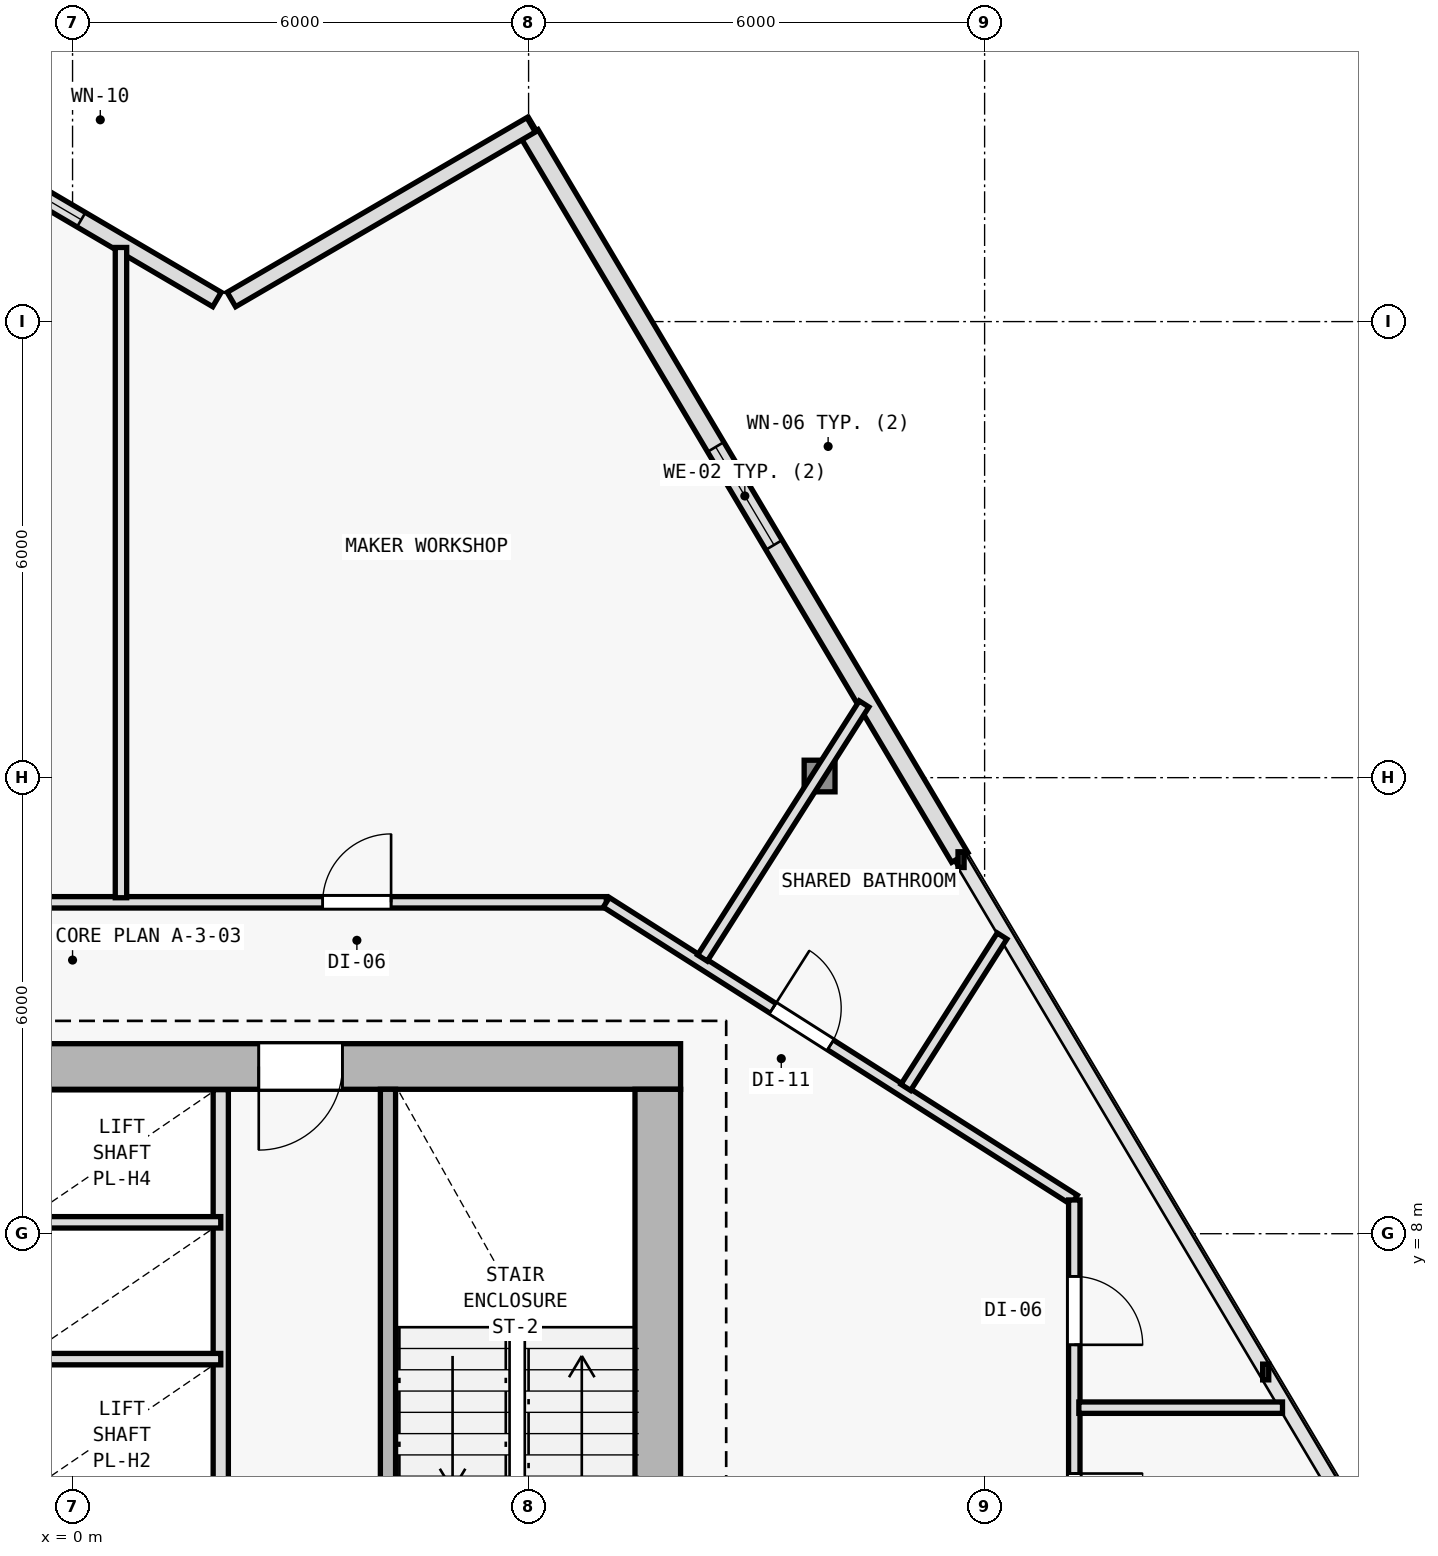
"""IFC4 building model, lengths in metres.
Left out: names, types, materials, properties, quantities, classifications, styles, units other than length and angle.
Written with IfcOpenShell. Run it as: python <this file> out.ifc"""

import sys

from ifc_helpers import new_model, si_unit, direction, frame, frame_2d, origin, origin_2d, place, context, subcontext, project, spatial, rectangle, i_section, extrude, element, fill, save


model = new_model("IFC4")
c1 = context("Model", 3, precision=1e-05, world=origin(), true_north=direction((0.0, 1.0)))
c2 = subcontext(c1, "Body", "Model", "MODEL_VIEW")
j1 = project(units=[si_unit("LENGTHUNIT", "METRE"), si_unit("PLANEANGLEUNIT", "RADIAN")], contexts=[c1])
p1 = place(None, origin())
s1 = spatial("IfcSite", under=j1, at=p1, CompositionType="ELEMENT")
p2 = place(p1, origin())
s2 = spatial("IfcBuilding", under=s1, at=p2, CompositionType="ELEMENT")
p3 = place(p2, frame((0.0, 0.0, 118.5)))
s3 = spatial("IfcBuildingStorey", under=s2, at=p3, CompositionType="ELEMENT", Elevation=118.5)
p4 = place(p3, frame((7.7, 10.2, 0.0), z_axis=(0.0, 0.0, 1.0), x_axis=(1.0, 0.0, 0.0)))
e1 = element("IfcColumn", 1, at=p4, inside=s3, PredefinedType="COLUMN", context=c2, shape_type="SweptSolid", body=[
    extrude(i_section(OverallWidth=0.409, OverallDepth=0.425, WebThickness=0.021, FlangeThickness=0.034, FilletRadius=0.015, at=origin_2d()), origin(), (0.0, 0.0, 1.0), 3.6),
])
p5 = place(p3, frame((9.829, 14.021, 0.006), z_axis=(-0.011767853257, -0.00258484638, 0.999927415465), x_axis=(0.214538664031, -0.976715496773, 0.0)))
e2 = element("IfcColumn", 2, at=p5, inside=s3, PredefinedType="COLUMN", context=c2, shape_type="SweptSolid", body=[
    extrude(i_section(OverallWidth=0.406, OverallDepth=0.416, WebThickness=0.019, FlangeThickness=0.031, FilletRadius=0.015, at=origin_2d()), origin(), (0.0, 0.0, 1.0), 3.589),
])
p6 = place(p3, frame((6.017, 22.462, 0.0), z_axis=(0.0, 0.0, 1.0), x_axis=(0.511085523564, -0.859529864288, 0.0)))
e3 = element("IfcWall", 3, at=p6, inside=s3, PredefinedType="SOLIDWALL", context=c2, shape_type="SweptSolid", body=[
    extrude(rectangle(XDim=11.068, YDim=0.25, at=frame_2d((5.534, 0.0))), origin(), (0.0, 0.0, 1.0), 3.35),
])
p7 = place(p6, frame((4.784, 0.0, 0.62)))
e4 = element("IfcOpeningElement", 4, at=p7, cuts=e3, PredefinedType="OPENING", context=c2, shape_type="SweptSolid", body=[
    extrude(rectangle(XDim=1.5, YDim=2.0, at=frame_2d((0.75, 1.0))), frame((0.0, 0.135, 0.0), z_axis=(0.0, -1.0, 0.0), x_axis=(1.0, 0.0, 0.0)), (0.0, 0.0, 1.0), 0.27),
])
p8 = place(p3, frame((2.09, 20.291, 0.0), z_axis=(0.0, 0.0, 1.0), x_axis=(0.863978647835, 0.503528446153, 0.0)))
e5 = element("IfcWall", 5, at=p8, inside=s3, PredefinedType="SOLIDWALL", context=c2, shape_type="SweptSolid", body=[
    extrude(rectangle(XDim=4.564, YDim=0.22, at=frame_2d((2.282, 0.0))), origin(), (0.0, 0.0, 1.0), 3.35),
])
p9 = place(p3, frame((-2.447, 22.846, 0.0), z_axis=(0.0, 0.0, 1.0), x_axis=(0.8621357974, -0.506677280763, 0.0)))
e6 = element("IfcWall", 6, at=p9, inside=s3, PredefinedType="SOLIDWALL", context=c2, shape_type="SweptSolid", body=[
    extrude(rectangle(XDim=5.042, YDim=0.22, at=frame_2d((2.521, 0.0))), origin(), (0.0, 0.0, 1.0), 3.35),
])
p10 = place(p9, frame((2.071, 0.0, 0.62)))
e7 = element("IfcOpeningElement", 7, at=p10, cuts=e6, PredefinedType="OPENING", context=c2, shape_type="SweptSolid", body=[
    extrude(rectangle(XDim=0.9, YDim=1.6, at=frame_2d((0.45, 0.8))), frame((0.0, 0.12, 0.0), z_axis=(0.0, -1.0, 0.0), x_axis=(1.0, 0.0, 0.0)), (0.0, 0.0, 1.0), 0.24),
])
p11 = place(p3, frame((8.0, 10.2, 0.0), z_axis=(0.0, 0.0, 1.0), x_axis=(-1.0, 0.0, 0.0)))
e8 = element("IfcWall", 8, at=p11, inside=s3, PredefinedType="SHEAR", context=c2, shape_type="SweptSolid", body=[
    extrude(rectangle(XDim=16.0, YDim=0.6, at=frame_2d((8.0, 0.0))), origin(), (0.0, 0.0, 1.0), 3.35),
])
p12 = place(p11, frame((4.45, 0.0, 0.0)))
e9 = element("IfcOpeningElement", 9, at=p12, cuts=e8, PredefinedType="OPENING", context=c2, shape_type="SweptSolid", body=[
    extrude(rectangle(XDim=1.1, YDim=2.15, at=frame_2d((0.55, 1.075))), frame((0.0, 0.31, 0.0), z_axis=(0.0, -1.0, 0.0), x_axis=(1.0, 0.0, 0.0)), (0.0, 0.0, 1.0), 0.62),
])
p13 = place(p3, frame((7.7, 9.9, 0.0), z_axis=(0.0, 0.0, 1.0), x_axis=(0.0, -1.0, 0.0)))
e10 = element("IfcWall", 10, at=p13, inside=s3, PredefinedType="SHEAR", context=c2, shape_type="SweptSolid", body=[
    extrude(rectangle(XDim=19.0, YDim=0.6, at=frame_2d((9.5, 0.0))), origin(), (0.0, 0.0, 1.0), 3.35),
])
p14 = place(p3, frame((4.15, 2.75, 0.0), z_axis=(0.0, 0.0, 1.0), x_axis=(0.0, 1.0, 0.0)))
e11 = element("IfcWall", 11, at=p14, inside=s3, PredefinedType="SOLIDWALL", context=c2, shape_type="SweptSolid", body=[
    extrude(rectangle(XDim=7.15, YDim=0.2, at=frame_2d((3.575, 0.0))), origin(), (0.0, 0.0, 1.0), 3.35),
])
p15 = place(p14, frame((0.35, 0.0, 0.0)))
e12 = element("IfcOpeningElement", 12, at=p15, cuts=e11, PredefinedType="OPENING", context=c2, shape_type="SweptSolid", body=[
    extrude(rectangle(XDim=1.0, YDim=2.15, at=frame_2d((0.5, 1.075))), frame((0.0, 0.11, 0.0), z_axis=(0.0, -1.0, 0.0), x_axis=(1.0, 0.0, 0.0)), (0.0, 0.0, 1.0), 0.22),
])
p16 = place(p3, frame((1.95, 2.65, 0.0), z_axis=(0.0, 0.0, 1.0), x_axis=(0.0, 1.0, 0.0)))
e13 = element("IfcWall", 13, at=p16, inside=s3, PredefinedType="SOLIDWALL", context=c2, shape_type="SweptSolid", body=[
    extrude(rectangle(XDim=7.245, YDim=0.2, at=frame_2d((3.623, 0.0))), origin(), (0.0, 0.0, 1.0), 3.35),
])
for number, where, z_axis, x_axis in (
    (14, (-0.75, 6.35, 0.0), (0.0, 0.0, 1.0), (1.0, 0.0, 0.0)),
    (15, (-0.75, 8.15, 0.0), (0.0, 0.0, 1.0), (1.0, 0.0, 0.0)),
):
    element("IfcWall", number, at=place(p3, frame(where, z_axis=z_axis, x_axis=x_axis)), inside=s3, PredefinedType="PARTITIONING", context=c2, shape_type="SweptSolid", body=[
        extrude(rectangle(XDim=2.7, YDim=0.15, at=frame_2d((1.35, 0.0))), origin(), (0.0, 0.0, 1.0), 3.35),
    ])
p17 = place(p3, frame((-7.041, 12.36, 0.0), z_axis=(0.0, 0.0, 1.0), x_axis=(1.0, 0.0, 0.0)))
e16 = element("IfcWall", 16, at=p17, inside=s3, PredefinedType="PARTITIONING", context=c2, shape_type="SweptSolid", body=[
    extrude(rectangle(XDim=14.064, YDim=0.15, at=frame_2d((7.032, 0.0))), origin(), (0.0, 0.0, 1.0), 3.35),
])
p18 = place(p17, frame((10.332, 0.0, 0.0)))
e17 = element("IfcOpeningElement", 17, at=p18, cuts=e16, PredefinedType="OPENING", context=c2, shape_type="SweptSolid", body=[
    extrude(rectangle(XDim=0.9, YDim=2.1, at=frame_2d((0.45, 1.05))), frame((0.0, 0.085, 0.0), z_axis=(0.0, -1.0, 0.0), x_axis=(1.0, 0.0, 0.0)), (0.0, 0.0, 1.0), 0.17),
])
p19 = place(p17, frame((3.478, 0.0, 0.0)))
e18 = element("IfcOpeningElement", 18, at=p19, cuts=e16, PredefinedType="OPENING", context=c2, shape_type="SweptSolid", body=[
    extrude(rectangle(XDim=0.9, YDim=2.1, at=frame_2d((0.45, 1.05))), frame((0.0, 0.085, 0.0), z_axis=(0.0, -1.0, 0.0), x_axis=(1.0, 0.0, 0.0)), (0.0, 0.0, 1.0), 0.17),
])
p20 = place(p3, frame((7.023, 12.36, 0.0), z_axis=(0.0, 0.0, 1.0), x_axis=(0.84376480085, -0.536713108511, 0.0)))
e19 = element("IfcWall", 19, at=p20, inside=s3, PredefinedType="PARTITIONING", context=c2, shape_type="SweptSolid", body=[
    extrude(rectangle(XDim=7.297, YDim=0.15, at=frame_2d((3.648, 0.0))), origin(), (0.0, 0.0, 1.0), 2.825),
])
p21 = place(p20, frame((2.595, 0.0, 0.0)))
e20 = element("IfcOpeningElement", 20, at=p21, cuts=e19, PredefinedType="OPENING", context=c2, shape_type="SweptSolid", body=[
    extrude(rectangle(XDim=0.9, YDim=2.1, at=frame_2d((0.45, 1.05))), frame((0.0, 0.085, 0.0), z_axis=(0.0, -1.0, 0.0), x_axis=(1.0, 0.0, 0.0)), (0.0, 0.0, 1.0), 0.17),
])
p22 = place(p3, frame((13.18, 8.444, 0.0), z_axis=(0.0, 0.0, 1.0), x_axis=(0.0, -1.0, 0.0)))
e21 = element("IfcWall", 21, at=p22, inside=s3, PredefinedType="PARTITIONING", context=c2, shape_type="SweptSolid", body=[
    extrude(rectangle(XDim=20.004, YDim=0.15, at=frame_2d((10.002, 0.0))), origin(), (0.0, 0.0, 1.0), 2.705),
])
p23 = place(p22, frame((17.587, 0.0, 0.0)))
e22 = element("IfcOpeningElement", 22, at=p23, cuts=e21, PredefinedType="OPENING", context=c2, shape_type="SweptSolid", body=[
    extrude(rectangle(XDim=0.9, YDim=2.1, at=frame_2d((0.45, 1.05))), frame((0.0, 0.085, 0.0), z_axis=(0.0, -1.0, 0.0), x_axis=(1.0, 0.0, 0.0)), (0.0, 0.0, 1.0), 0.17),
])
p24 = place(p22, frame((13.837, 0.0, 0.0)))
e23 = element("IfcOpeningElement", 23, at=p24, cuts=e21, PredefinedType="OPENING", context=c2, shape_type="SweptSolid", body=[
    extrude(rectangle(XDim=0.9, YDim=2.1, at=frame_2d((0.45, 1.05))), frame((0.0, 0.085, 0.0), z_axis=(0.0, -1.0, 0.0), x_axis=(1.0, 0.0, 0.0)), (0.0, 0.0, 1.0), 0.17),
])
p25 = place(p22, frame((8.396, 0.0, 0.0)))
e24 = element("IfcOpeningElement", 24, at=p25, cuts=e21, PredefinedType="OPENING", context=c2, shape_type="SweptSolid", body=[
    extrude(rectangle(XDim=0.9, YDim=2.1, at=frame_2d((0.45, 1.05))), frame((0.0, 0.085, 0.0), z_axis=(0.0, -1.0, 0.0), x_axis=(1.0, 0.0, 0.0)), (0.0, 0.0, 1.0), 0.17),
])
p26 = place(p22, frame((3.599, 0.0, 0.0)))
e25 = element("IfcOpeningElement", 25, at=p26, cuts=e21, PredefinedType="OPENING", context=c2, shape_type="SweptSolid", body=[
    extrude(rectangle(XDim=0.9, YDim=2.1, at=frame_2d((0.45, 1.05))), frame((0.0, 0.085, 0.0), z_axis=(0.0, -1.0, 0.0), x_axis=(1.0, 0.0, 0.0)), (0.0, 0.0, 1.0), 0.17),
])
p27 = place(p22, frame((1.005, 0.0, 0.0)))
e26 = element("IfcOpeningElement", 26, at=p27, cuts=e21, PredefinedType="OPENING", context=c2, shape_type="SweptSolid", body=[
    extrude(rectangle(XDim=0.9, YDim=2.1, at=frame_2d((0.45, 1.05))), frame((0.0, 0.085, 0.0), z_axis=(0.0, -1.0, 0.0), x_axis=(1.0, 0.0, 0.0)), (0.0, 0.0, 1.0), 0.17),
])
p28 = place(p3, frame((8.288, 11.627, 0.0), z_axis=(0.0, 0.0, 1.0), x_axis=(0.536668135248, 0.843793406356, 0.0)))
e27 = element("IfcWall", 27, at=p28, inside=s3, PredefinedType="PARTITIONING", context=c2, shape_type="SweptSolid", body=[
    extrude(rectangle(XDim=3.962, YDim=0.15, at=frame_2d((1.981, 0.0))), origin(), (0.0, 0.0, 1.0), 2.825),
])
p29 = place(p3, frame((10.963, 9.925, 0.0), z_axis=(0.0, 0.0, 1.0), x_axis=(0.536667979265, 0.843793505564, 0.0)))
e28 = element("IfcWall", 28, at=p29, inside=s3, PredefinedType="PARTITIONING", context=c2, shape_type="SweptSolid", body=[
    extrude(rectangle(XDim=2.36, YDim=0.15, at=frame_2d((1.18, 0.0))), origin(), (0.0, 0.0, 1.0), 2.885),
])
p30 = place(p3, frame((13.24, 5.711, 0.0), z_axis=(0.0, 0.0, 1.0), x_axis=(1.0, 0.0, 0.0)))
e29 = element("IfcWall", 29, at=p30, inside=s3, PredefinedType="PARTITIONING", context=c2, shape_type="SweptSolid", body=[
    extrude(rectangle(XDim=2.679, YDim=0.15, at=frame_2d((1.34, 0.0))), origin(), (0.0, 0.0, 1.0), 2.885),
])
p31 = place(p3, frame((0.637, 12.42, 0.0), z_axis=(0.0, 0.0, 1.0), x_axis=(0.0, 1.0, 0.0)))
e30 = element("IfcWall", 30, at=p31, inside=s3, PredefinedType="PARTITIONING", context=c2, shape_type="SweptSolid", body=[
    extrude(rectangle(XDim=8.555, YDim=0.15, at=frame_2d((4.278, 0.0))), origin(), (0.0, 0.0, 1.0), 2.885),
])
p32 = place(p7, origin())
e31 = element("IfcWindow", 31, at=p32, inside=s3, PartitioningType="SINGLE_PANEL", PredefinedType="WINDOW", context=c2, shape_type="SweptSolid", body=[
    extrude(rectangle(XDim=1.5, YDim=2.0, at=frame_2d((0.75, 1.0))), frame((0.0, 0.03, 0.0), z_axis=(0.0, -1.0, 0.0), x_axis=(1.0, 0.0, 0.0)), (0.0, 0.0, 1.0), 0.06),
])
fill(e4, e31)
p33 = place(p10, origin())
e32 = element("IfcWindow", 32, at=p33, inside=s3, PartitioningType="SINGLE_PANEL", PredefinedType="WINDOW", context=c2, shape_type="SweptSolid", body=[
    extrude(rectangle(XDim=0.9, YDim=1.6, at=frame_2d((0.45, 0.8))), frame((0.0, 0.03, 0.0), z_axis=(0.0, -1.0, 0.0), x_axis=(1.0, 0.0, 0.0)), (0.0, 0.0, 1.0), 0.06),
])
fill(e7, e32)
p34 = place(p12, origin())
e33 = element("IfcDoor", 33, at=p34, inside=s3, OperationType="SINGLE_SWING_RIGHT", PredefinedType="DOOR", context=c2, shape_type="SweptSolid", body=[
    extrude(rectangle(XDim=1.1, YDim=2.15, at=frame_2d((0.55, 1.075))), frame((0.0, 0.025, 0.0), z_axis=(0.0, -1.0, 0.0), x_axis=(1.0, 0.0, 0.0)), (0.0, 0.0, 1.0), 0.05),
])
fill(e9, e33)
p35 = place(p26, origin())
e34 = element("IfcDoor", 34, at=p35, inside=s3, OperationType="SINGLE_SWING_LEFT", PredefinedType="DOOR", context=c2, shape_type="SweptSolid", body=[
    extrude(rectangle(XDim=0.9, YDim=2.1, at=frame_2d((0.45, 1.05))), frame((0.0, 0.025, 0.0), z_axis=(0.0, -1.0, 0.0), x_axis=(1.0, 0.0, 0.0)), (0.0, 0.0, 1.0), 0.05),
])
fill(e25, e34)
p36 = place(p27, origin())
e35 = element("IfcDoor", 35, at=p36, inside=s3, OperationType="SINGLE_SWING_RIGHT", PredefinedType="DOOR", context=c2, shape_type="SweptSolid", body=[
    extrude(rectangle(XDim=0.9, YDim=2.1, at=frame_2d((0.45, 1.05))), frame((0.0, 0.025, 0.0), z_axis=(0.0, -1.0, 0.0), x_axis=(1.0, 0.0, 0.0)), (0.0, 0.0, 1.0), 0.05),
])
fill(e26, e35)
p37 = place(p21, origin())
e36 = element("IfcDoor", 36, at=p37, inside=s3, OperationType="SINGLE_SWING_LEFT", PredefinedType="DOOR", context=c2, shape_type="SweptSolid", body=[
    extrude(rectangle(XDim=0.9, YDim=2.1, at=frame_2d((0.45, 1.05))), frame((0.0, 0.025, 0.0), z_axis=(0.0, -1.0, 0.0), x_axis=(1.0, 0.0, 0.0)), (0.0, 0.0, 1.0), 0.05),
])
fill(e20, e36)
p38 = place(p18, origin())
e37 = element("IfcDoor", 37, at=p38, inside=s3, OperationType="SINGLE_SWING_RIGHT", PredefinedType="DOOR", context=c2, shape_type="SweptSolid", body=[
    extrude(rectangle(XDim=0.9, YDim=2.1, at=frame_2d((0.45, 1.05))), frame((0.0, 0.025, 0.0), z_axis=(0.0, -1.0, 0.0), x_axis=(1.0, 0.0, 0.0)), (0.0, 0.0, 1.0), 0.05),
])
fill(e17, e37)
save(model, sys.argv[1])
